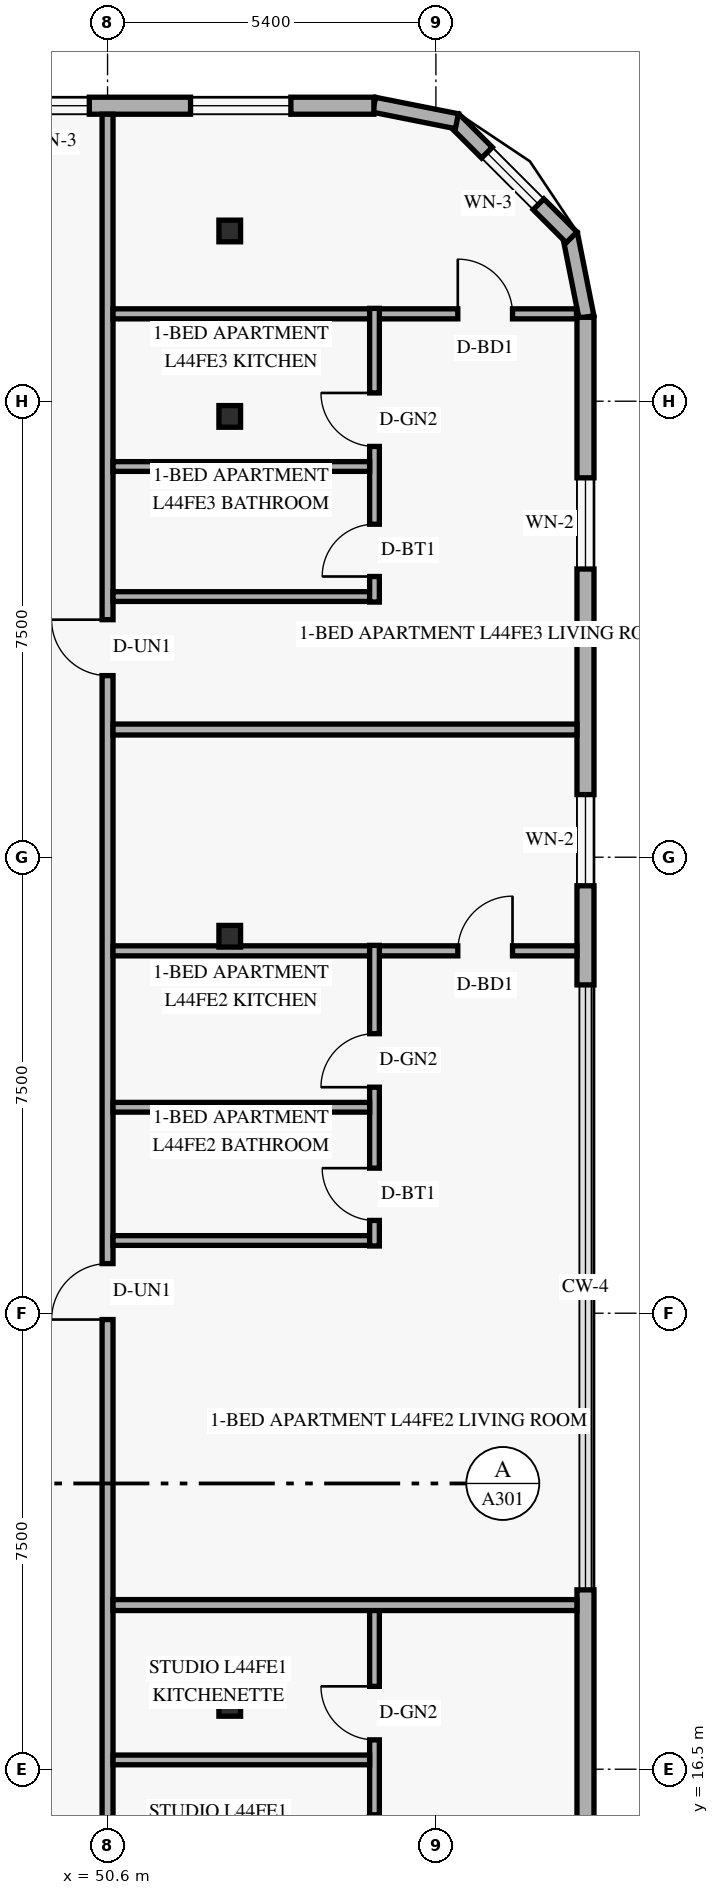
"""IFC4 building model, lengths in metres.
Left out: names, types, materials, properties, quantities, classifications, styles, units other than length and angle.
Written with IfcOpenShell. Run it as: python <this file> out.ifc"""

import sys

from ifc_helpers import new_model, si_unit, direction, frame, frame_2d, origin, origin_2d, place, context, subcontext, project, spatial, rectangle, hollow_rectangle, extrude, element, fill, save


model = new_model("IFC4")
c1 = context("Model", 3, precision=1e-05, world=origin(), true_north=direction((0.0, 1.0)))
c2 = subcontext(c1, "Body", "Model", "MODEL_VIEW")
j1 = project(units=[si_unit("LENGTHUNIT", "METRE"), si_unit("PLANEANGLEUNIT", "RADIAN")], contexts=[c1])
p1 = place(None, origin())
s1 = spatial("IfcSite", under=j1, at=p1, CompositionType="ELEMENT")
p2 = place(p1, origin())
s2 = spatial("IfcBuilding", under=s1, at=p2, CompositionType="ELEMENT")
p3 = place(p2, frame((0.0, 0.0, 169.8)))
s3 = spatial("IfcBuildingStorey", under=s2, at=p3, CompositionType="ELEMENT", Elevation=169.8)
for number, where, z_axis, x_axis in (
    (1, (52.505, 17.55, 0.0), (0.058, 0.0, 0.998), (0.0, 1.0, 0.0)),
    (2, (52.505, 30.2, 0.0), (0.058, 0.0, 0.998), (0.0, 1.0, 0.0)),
    (3, (52.505, 38.75, 0.0), (0.058, 0.0, 0.998), (0.0, 1.0, 0.0)),
    (4, (52.505, 41.8, 0.0), (0.058, 0.0, 0.998), (0.0, 1.0, 0.0)),
):
    element("IfcColumn", number, at=place(p3, frame(where, z_axis=z_axis, x_axis=x_axis)), inside=s3, PredefinedType="COLUMN", context=c2, shape_type="SweptSolid", body=[
        extrude(hollow_rectangle(XDim=0.356, YDim=0.356, WallThickness=0.016, at=origin_2d()), origin(), (0.0, 0.0, 1.0), 3.606),
    ])
p4 = place(p3, frame((58.476, 40.384, 0.0), z_axis=(0.0, 0.0, 1.0), x_axis=(-0.19496651342, 0.980809899341, 0.0)))
e5 = element("IfcWall", 5, at=p4, inside=s3, PredefinedType="SOLIDWALL", context=c2, shape_type="SweptSolid", body=[
    extrude(rectangle(XDim=1.389, YDim=0.25, at=frame_2d((0.694, 0.0))), origin(), (0.0, 0.0, 1.0), 3.35),
])
p5 = place(p3, frame((58.232, 41.695, 0.0), z_axis=(0.0, 0.0, 1.0), x_axis=(-0.707106781187, 0.707106781187, 0.0)))
e6 = element("IfcWall", 6, at=p5, inside=s3, PredefinedType="SOLIDWALL", context=c2, shape_type="SweptSolid", body=[
    extrude(rectangle(XDim=2.739, YDim=0.25, at=frame_2d((1.37, 0.0))), origin(), (0.0, 0.0, 1.0), 3.35),
])
p6 = place(p5, frame((0.77, 0.0, 0.85)))
e7 = element("IfcOpeningElement", 7, at=p6, cuts=e6, PredefinedType="OPENING", context=c2, shape_type="SweptSolid", body=[
    extrude(rectangle(XDim=1.2, YDim=1.5, at=frame_2d((0.6, 0.75))), frame((0.0, 0.135, 0.0), z_axis=(0.0, -1.0, 0.0), x_axis=(1.0, 0.0, 0.0)), (0.0, 0.0, 1.0), 0.27),
])
p7 = place(p3, frame((56.345, 43.605, 0.0), z_axis=(0.0, 0.0, 1.0), x_axis=(-0.980809899341, 0.19496651342, 0.0)))
e8 = element("IfcWall", 8, at=p7, inside=s3, PredefinedType="SOLIDWALL", context=c2, shape_type="SweptSolid", body=[
    extrude(rectangle(XDim=1.389, YDim=0.25, at=frame_2d((0.694, 0.0))), origin(), (0.0, 0.0, 1.0), 3.35),
])
p8 = place(p3, frame((58.46, 7.62, 0.0), z_axis=(0.0, 0.0, 1.0), x_axis=(0.0, 1.0, 0.0)))
e9 = element("IfcWall", 9, at=p8, inside=s3, PredefinedType="SOLIDWALL", context=c2, shape_type="SweptSolid", body=[
    extrude(rectangle(XDim=11.83, YDim=0.28, at=frame_2d((5.915, 0.0))), origin(), (0.0, 0.0, 1.0), 3.35),
])
p9 = place(p8, frame((5.165, 0.0, 0.85)))
e10 = element("IfcOpeningElement", 10, at=p9, cuts=e9, PredefinedType="OPENING", context=c2, shape_type="SweptSolid", body=[
    extrude(rectangle(XDim=1.5, YDim=1.55, at=frame_2d((0.75, 0.775))), frame((0.0, 0.15, 0.0), z_axis=(0.0, -1.0, 0.0), x_axis=(1.0, 0.0, 0.0)), (0.0, 0.0, 1.0), 0.3),
])
p10 = place(p3, frame((58.46, 29.4, 0.0), z_axis=(0.0, 0.0, 1.0), x_axis=(0.0, 1.0, 0.0)))
e11 = element("IfcWall", 11, at=p10, inside=s3, PredefinedType="SOLIDWALL", context=c2, shape_type="SweptSolid", body=[
    extrude(rectangle(XDim=10.98, YDim=0.28, at=frame_2d((5.49, 0.0))), origin(), (0.0, 0.0, 1.0), 3.35),
])
p11 = place(p10, frame((1.63, 0.0, 0.85)))
e12 = element("IfcOpeningElement", 12, at=p11, cuts=e11, PredefinedType="OPENING", context=c2, shape_type="SweptSolid", body=[
    extrude(rectangle(XDim=1.5, YDim=1.55, at=frame_2d((0.75, 0.775))), frame((0.0, 0.15, 0.0), z_axis=(0.0, -1.0, 0.0), x_axis=(1.0, 0.0, 0.0)), (0.0, 0.0, 1.0), 0.3),
])
p12 = place(p10, frame((6.84, 0.0, 0.85)))
e13 = element("IfcOpeningElement", 13, at=p12, cuts=e11, PredefinedType="OPENING", context=c2, shape_type="SweptSolid", body=[
    extrude(rectangle(XDim=1.5, YDim=1.55, at=frame_2d((0.75, 0.775))), frame((0.0, 0.15, 0.0), z_axis=(0.0, -1.0, 0.0), x_axis=(1.0, 0.0, 0.0)), (0.0, 0.0, 1.0), 0.3),
])
p13 = place(p3, frame((54.98, 43.86, 0.0), z_axis=(0.0, 0.0, 1.0), x_axis=(-1.0, 0.0, 0.0)))
e14 = element("IfcWall", 14, at=p13, inside=s3, PredefinedType="SOLIDWALL", context=c2, shape_type="SweptSolid", body=[
    extrude(rectangle(XDim=33.76, YDim=0.28, at=frame_2d((16.88, 0.0))), origin(), (0.0, 0.0, 1.0), 3.35),
])
p14 = place(p13, frame((28.555, 0.0, 0.85)))
e15 = element("IfcOpeningElement", 15, at=p14, cuts=e14, PredefinedType="OPENING", context=c2, shape_type="SweptSolid", body=[
    extrude(rectangle(XDim=1.65, YDim=1.6, at=frame_2d((0.825, 0.8))), frame((0.0, 0.15, 0.0), z_axis=(0.0, -1.0, 0.0), x_axis=(1.0, 0.0, 0.0)), (0.0, 0.0, 1.0), 0.3),
])
p15 = place(p13, frame((21.67, 0.0, 0.85)))
e16 = element("IfcOpeningElement", 16, at=p15, cuts=e14, PredefinedType="OPENING", context=c2, shape_type="SweptSolid", body=[
    extrude(rectangle(XDim=1.65, YDim=1.6, at=frame_2d((0.825, 0.8))), frame((0.0, 0.15, 0.0), z_axis=(0.0, -1.0, 0.0), x_axis=(1.0, 0.0, 0.0)), (0.0, 0.0, 1.0), 0.3),
])
p16 = place(p13, frame((17.44, 0.0, 0.85)))
e17 = element("IfcOpeningElement", 17, at=p16, cuts=e14, PredefinedType="OPENING", context=c2, shape_type="SweptSolid", body=[
    extrude(rectangle(XDim=1.65, YDim=1.6, at=frame_2d((0.825, 0.8))), frame((0.0, 0.15, 0.0), z_axis=(0.0, -1.0, 0.0), x_axis=(1.0, 0.0, 0.0)), (0.0, 0.0, 1.0), 0.3),
])
p17 = place(p13, frame((13.245, 0.0, 0.85)))
e18 = element("IfcOpeningElement", 18, at=p17, cuts=e14, PredefinedType="OPENING", context=c2, shape_type="SweptSolid", body=[
    extrude(rectangle(XDim=1.65, YDim=1.6, at=frame_2d((0.825, 0.8))), frame((0.0, 0.15, 0.0), z_axis=(0.0, -1.0, 0.0), x_axis=(1.0, 0.0, 0.0)), (0.0, 0.0, 1.0), 0.3),
])
p18 = place(p13, frame((7.85, 0.0, 0.85)))
e19 = element("IfcOpeningElement", 19, at=p18, cuts=e14, PredefinedType="OPENING", context=c2, shape_type="SweptSolid", body=[
    extrude(rectangle(XDim=1.65, YDim=1.6, at=frame_2d((0.825, 0.8))), frame((0.0, 0.15, 0.0), z_axis=(0.0, -1.0, 0.0), x_axis=(1.0, 0.0, 0.0)), (0.0, 0.0, 1.0), 0.3),
])
p19 = place(p13, frame((4.68, 0.0, 0.85)))
e20 = element("IfcOpeningElement", 20, at=p19, cuts=e14, PredefinedType="OPENING", context=c2, shape_type="SweptSolid", body=[
    extrude(rectangle(XDim=1.2, YDim=1.5, at=frame_2d((0.6, 0.75))), frame((0.0, 0.15, 0.0), z_axis=(0.0, -1.0, 0.0), x_axis=(1.0, 0.0, 0.0)), (0.0, 0.0, 1.0), 0.3),
])
p20 = place(p13, frame((1.365, 0.0, 0.85)))
e21 = element("IfcOpeningElement", 21, at=p20, cuts=e14, PredefinedType="OPENING", context=c2, shape_type="SweptSolid", body=[
    extrude(rectangle(XDim=1.65, YDim=1.6, at=frame_2d((0.825, 0.8))), frame((0.0, 0.15, 0.0), z_axis=(0.0, -1.0, 0.0), x_axis=(1.0, 0.0, 0.0)), (0.0, 0.0, 1.0), 0.3),
])
p21 = place(p3, frame((50.6, 4.28, 0.0), z_axis=(0.0, 0.0, 1.0), x_axis=(0.0, 1.0, 0.0)))
e22 = element("IfcWall", 22, at=p21, inside=s3, PredefinedType="STANDARD", context=c2, shape_type="SweptSolid", body=[
    extrude(rectangle(XDim=39.44, YDim=0.18, at=frame_2d((19.72, 0.0))), origin(), (0.0, 0.0, 1.0), 2.72),
])
p22 = place(p21, frame((8.98, 0.0, 0.0)))
e23 = element("IfcOpeningElement", 23, at=p22, cuts=e22, PredefinedType="OPENING", context=c2, shape_type="SweptSolid", body=[
    extrude(rectangle(XDim=0.92, YDim=2.15, at=frame_2d((0.46, 1.075))), frame((0.0, 0.1, 0.0), z_axis=(0.0, -1.0, 0.0), x_axis=(1.0, 0.0, 0.0)), (0.0, 0.0, 1.0), 0.2),
])
p23 = place(p21, frame((19.616, 0.0, 0.0)))
e24 = element("IfcOpeningElement", 24, at=p23, cuts=e22, PredefinedType="OPENING", context=c2, shape_type="SweptSolid", body=[
    extrude(rectangle(XDim=0.92, YDim=2.15, at=frame_2d((0.46, 1.075))), frame((0.0, 0.1, 0.0), z_axis=(0.0, -1.0, 0.0), x_axis=(1.0, 0.0, 0.0)), (0.0, 0.0, 1.0), 0.2),
])
p24 = place(p21, frame((30.207, 0.0, 0.0)))
e25 = element("IfcOpeningElement", 25, at=p24, cuts=e22, PredefinedType="OPENING", context=c2, shape_type="SweptSolid", body=[
    extrude(rectangle(XDim=0.92, YDim=2.15, at=frame_2d((0.46, 1.075))), frame((0.0, 0.1, 0.0), z_axis=(0.0, -1.0, 0.0), x_axis=(1.0, 0.0, 0.0)), (0.0, 0.0, 1.0), 0.2),
])
p25 = place(p3, frame((54.99, 14.47, 0.0), z_axis=(0.0, 0.0, 1.0), x_axis=(0.0, 1.0, 0.0)))
e26 = element("IfcWall", 26, at=p25, inside=s3, PredefinedType="PLUMBINGWALL", context=c2, shape_type="SweptSolid", body=[
    extrude(rectangle(XDim=4.73, YDim=0.16, at=frame_2d((2.365, 0.0))), origin(), (0.0, 0.0, 1.0), 3.35),
])
p26 = place(p25, frame((0.42, 0.0, 0.0)))
e27 = element("IfcOpeningElement", 27, at=p26, cuts=e26, PredefinedType="OPENING", context=c2, shape_type="SweptSolid", body=[
    extrude(rectangle(XDim=0.86, YDim=2.12, at=frame_2d((0.43, 1.06))), frame((0.0, 0.09, 0.0), z_axis=(0.0, -1.0, 0.0), x_axis=(1.0, 0.0, 0.0)), (0.0, 0.0, 1.0), 0.18),
])
p27 = place(p25, frame((2.513, 0.0, 0.0)))
e28 = element("IfcOpeningElement", 28, at=p27, cuts=e26, PredefinedType="OPENING", context=c2, shape_type="SweptSolid", body=[
    extrude(rectangle(XDim=0.88, YDim=2.12, at=frame_2d((0.44, 1.06))), frame((0.0, 0.09, 0.0), z_axis=(0.0, -1.0, 0.0), x_axis=(1.0, 0.0, 0.0)), (0.0, 0.0, 1.0), 0.18),
])
p28 = place(p3, frame((50.69, 16.653, 0.0), z_axis=(0.0, 0.0, 1.0), x_axis=(1.0, 0.0, 0.0)))
e29 = element("IfcWall", 29, at=p28, inside=s3, PredefinedType="PLUMBINGWALL", context=c2, shape_type="SweptSolid", body=[
    extrude(rectangle(XDim=4.22, YDim=0.16, at=frame_2d((2.11, 0.0))), origin(), (0.0, 0.0, 1.0), 2.869),
])
p29 = place(p3, frame((50.69, 19.2, 0.0), z_axis=(0.0, 0.0, 1.0), x_axis=(1.0, 0.0, 0.0)))
e30 = element("IfcWall", 30, at=p29, inside=s3, PredefinedType="PARTITIONING", context=c2, shape_type="SweptSolid", body=[
    extrude(rectangle(XDim=7.63, YDim=0.18, at=frame_2d((3.815, 0.0))), origin(), (0.0, 0.0, 1.0), 2.869),
])
p30 = place(p3, frame((50.69, 29.96, 0.0), z_axis=(0.0, 0.0, 1.0), x_axis=(1.0, 0.0, 0.0)))
e31 = element("IfcWall", 31, at=p30, inside=s3, PredefinedType="PARTITIONING", context=c2, shape_type="SweptSolid", body=[
    extrude(rectangle(XDim=7.63, YDim=0.165, at=frame_2d((3.815, 0.0))), origin(), (0.0, 0.0, 1.0), 2.869),
])
p31 = place(p30, frame((5.67, 0.0, 0.0)))
e32 = element("IfcOpeningElement", 32, at=p31, cuts=e31, PredefinedType="OPENING", context=c2, shape_type="SweptSolid", body=[
    extrude(rectangle(XDim=0.9, YDim=2.14, at=frame_2d((0.45, 1.07))), frame((0.0, 0.093, 0.0), z_axis=(0.0, -1.0, 0.0), x_axis=(1.0, 0.0, 0.0)), (0.0, 0.0, 1.0), 0.185),
])
p32 = place(p3, frame((50.69, 25.196, 0.0), z_axis=(0.0, 0.0, 1.0), x_axis=(1.0, 0.0, 0.0)))
e33 = element("IfcWall", 33, at=p32, inside=s3, PredefinedType="PLUMBINGWALL", context=c2, shape_type="SweptSolid", body=[
    extrude(rectangle(XDim=4.38, YDim=0.16, at=frame_2d((2.19, 0.0))), origin(), (0.0, 0.0, 1.0), 2.869),
])
p33 = place(p3, frame((54.99, 25.106, 0.0), z_axis=(0.0, 0.0, 1.0), x_axis=(0.0, 1.0, 0.0)))
e34 = element("IfcWall", 34, at=p33, inside=s3, PredefinedType="PLUMBINGWALL", context=c2, shape_type="SweptSolid", body=[
    extrude(rectangle(XDim=4.944, YDim=0.16, at=frame_2d((2.472, 0.0))), origin(), (0.0, 0.0, 1.0), 3.35),
])
p34 = place(p33, frame((0.42, 0.0, 0.0)))
e35 = element("IfcOpeningElement", 35, at=p34, cuts=e34, PredefinedType="OPENING", context=c2, shape_type="SweptSolid", body=[
    extrude(rectangle(XDim=0.86, YDim=2.12, at=frame_2d((0.43, 1.06))), frame((0.0, 0.09, 0.0), z_axis=(0.0, -1.0, 0.0), x_axis=(1.0, 0.0, 0.0)), (0.0, 0.0, 1.0), 0.18),
])
p35 = place(p33, frame((2.611, 0.0, 0.0)))
e36 = element("IfcOpeningElement", 36, at=p35, cuts=e34, PredefinedType="OPENING", context=c2, shape_type="SweptSolid", body=[
    extrude(rectangle(XDim=0.88, YDim=2.12, at=frame_2d((0.44, 1.06))), frame((0.0, 0.09, 0.0), z_axis=(0.0, -1.0, 0.0), x_axis=(1.0, 0.0, 0.0)), (0.0, 0.0, 1.0), 0.18),
])
p36 = place(p3, frame((50.69, 27.387, 0.0), z_axis=(0.0, 0.0, 1.0), x_axis=(1.0, 0.0, 0.0)))
e37 = element("IfcWall", 37, at=p36, inside=s3, PredefinedType="PLUMBINGWALL", context=c2, shape_type="SweptSolid", body=[
    extrude(rectangle(XDim=4.22, YDim=0.16, at=frame_2d((2.11, 0.0))), origin(), (0.0, 0.0, 1.0), 2.869),
])
p37 = place(p3, frame((50.69, 33.6, 0.0), z_axis=(0.0, 0.0, 1.0), x_axis=(1.0, 0.0, 0.0)))
e38 = element("IfcWall", 38, at=p37, inside=s3, PredefinedType="PARTITIONING", context=c2, shape_type="SweptSolid", body=[
    extrude(rectangle(XDim=7.63, YDim=0.18, at=frame_2d((3.815, 0.0))), origin(), (0.0, 0.0, 1.0), 2.869),
])
p38 = place(p3, frame((50.69, 40.437, 0.0), z_axis=(0.0, 0.0, 1.0), x_axis=(1.0, 0.0, 0.0)))
e39 = element("IfcWall", 39, at=p38, inside=s3, PredefinedType="PARTITIONING", context=c2, shape_type="SweptSolid", body=[
    extrude(rectangle(XDim=7.622, YDim=0.165, at=frame_2d((3.811, 0.0))), origin(), (0.0, 0.0, 1.0), 2.869),
])
p39 = place(p38, frame((5.67, 0.0, 0.0)))
e40 = element("IfcOpeningElement", 40, at=p39, cuts=e39, PredefinedType="OPENING", context=c2, shape_type="SweptSolid", body=[
    extrude(rectangle(XDim=0.9, YDim=2.14, at=frame_2d((0.45, 1.07))), frame((0.0, 0.093, 0.0), z_axis=(0.0, -1.0, 0.0), x_axis=(1.0, 0.0, 0.0)), (0.0, 0.0, 1.0), 0.185),
])
p40 = place(p3, frame((50.69, 35.787, 0.0), z_axis=(0.0, 0.0, 1.0), x_axis=(1.0, 0.0, 0.0)))
e41 = element("IfcWall", 41, at=p40, inside=s3, PredefinedType="PLUMBINGWALL", context=c2, shape_type="SweptSolid", body=[
    extrude(rectangle(XDim=4.38, YDim=0.16, at=frame_2d((2.19, 0.0))), origin(), (0.0, 0.0, 1.0), 2.869),
])
p41 = place(p3, frame((54.99, 35.697, 0.0), z_axis=(0.0, 0.0, 1.0), x_axis=(0.0, 1.0, 0.0)))
e42 = element("IfcWall", 42, at=p41, inside=s3, PredefinedType="PLUMBINGWALL", context=c2, shape_type="SweptSolid", body=[
    extrude(rectangle(XDim=4.83, YDim=0.16, at=frame_2d((2.415, 0.0))), origin(), (0.0, 0.0, 1.0), 3.35),
])
p42 = place(p41, frame((0.42, 0.0, 0.0)))
e43 = element("IfcOpeningElement", 43, at=p42, cuts=e42, PredefinedType="OPENING", context=c2, shape_type="SweptSolid", body=[
    extrude(rectangle(XDim=0.86, YDim=2.12, at=frame_2d((0.43, 1.06))), frame((0.0, 0.09, 0.0), z_axis=(0.0, -1.0, 0.0), x_axis=(1.0, 0.0, 0.0)), (0.0, 0.0, 1.0), 0.18),
])
p43 = place(p41, frame((2.559, 0.0, 0.0)))
e44 = element("IfcOpeningElement", 44, at=p43, cuts=e42, PredefinedType="OPENING", context=c2, shape_type="SweptSolid", body=[
    extrude(rectangle(XDim=0.88, YDim=2.12, at=frame_2d((0.44, 1.06))), frame((0.0, 0.09, 0.0), z_axis=(0.0, -1.0, 0.0), x_axis=(1.0, 0.0, 0.0)), (0.0, 0.0, 1.0), 0.18),
])
p44 = place(p3, frame((50.69, 37.926, 0.0), z_axis=(0.0, 0.0, 1.0), x_axis=(1.0, 0.0, 0.0)))
e45 = element("IfcWall", 45, at=p44, inside=s3, PredefinedType="PLUMBINGWALL", context=c2, shape_type="SweptSolid", body=[
    extrude(rectangle(XDim=4.22, YDim=0.16, at=frame_2d((2.11, 0.0))), origin(), (0.0, 0.0, 1.0), 2.869),
])
p45 = place(p6, origin())
e46 = element("IfcWindow", 46, at=p45, inside=s3, PartitioningType="SINGLE_PANEL", PredefinedType="WINDOW", context=c2, shape_type="SweptSolid", body=[
    extrude(rectangle(XDim=1.2, YDim=1.5, at=frame_2d((0.6, 0.75))), frame((0.0, 0.03, 0.0), z_axis=(0.0, -1.0, 0.0), x_axis=(1.0, 0.0, 0.0)), (0.0, 0.0, 1.0), 0.06),
])
fill(e7, e46)
p46 = place(p11, origin())
e47 = element("IfcWindow", 47, at=p46, inside=s3, PartitioningType="SINGLE_PANEL", PredefinedType="WINDOW", context=c2, shape_type="SweptSolid", body=[
    extrude(rectangle(XDim=1.5, YDim=1.55, at=frame_2d((0.75, 0.775))), frame((0.0, 0.03, 0.0), z_axis=(0.0, -1.0, 0.0), x_axis=(1.0, 0.0, 0.0)), (0.0, 0.0, 1.0), 0.06),
])
fill(e12, e47)
p47 = place(p12, origin())
e48 = element("IfcWindow", 48, at=p47, inside=s3, PartitioningType="SINGLE_PANEL", PredefinedType="WINDOW", context=c2, shape_type="SweptSolid", body=[
    extrude(rectangle(XDim=1.5, YDim=1.55, at=frame_2d((0.75, 0.775))), frame((0.0, 0.03, 0.0), z_axis=(0.0, -1.0, 0.0), x_axis=(1.0, 0.0, 0.0)), (0.0, 0.0, 1.0), 0.06),
])
fill(e13, e48)
p48 = place(p19, origin())
e49 = element("IfcWindow", 49, at=p48, inside=s3, PartitioningType="SINGLE_PANEL", PredefinedType="WINDOW", context=c2, shape_type="SweptSolid", body=[
    extrude(rectangle(XDim=1.2, YDim=1.5, at=frame_2d((0.6, 0.75))), frame((0.0, 0.03, 0.0), z_axis=(0.0, -1.0, 0.0), x_axis=(1.0, 0.0, 0.0)), (0.0, 0.0, 1.0), 0.06),
])
fill(e20, e49)
p49 = place(p20, origin())
e50 = element("IfcWindow", 50, at=p49, inside=s3, PartitioningType="SINGLE_PANEL", PredefinedType="WINDOW", context=c2, shape_type="SweptSolid", body=[
    extrude(rectangle(XDim=1.65, YDim=1.6, at=frame_2d((0.825, 0.8))), frame((0.0, 0.03, 0.0), z_axis=(0.0, -1.0, 0.0), x_axis=(1.0, 0.0, 0.0)), (0.0, 0.0, 1.0), 0.06),
])
fill(e21, e50)
p50 = place(p26, origin())
e51 = element("IfcDoor", 51, at=p50, inside=s3, OperationType="SINGLE_SWING_LEFT", PredefinedType="DOOR", context=c2, shape_type="SweptSolid", body=[
    extrude(rectangle(XDim=0.86, YDim=2.12, at=frame_2d((0.43, 1.06))), frame((0.0, 0.025, 0.0), z_axis=(0.0, -1.0, 0.0), x_axis=(1.0, 0.0, 0.0)), (0.0, 0.0, 1.0), 0.05),
])
fill(e27, e51)
p51 = place(p27, origin())
e52 = element("IfcDoor", 52, at=p51, inside=s3, OperationType="SINGLE_SWING_RIGHT", PredefinedType="DOOR", context=c2, shape_type="SweptSolid", body=[
    extrude(rectangle(XDim=0.88, YDim=2.12, at=frame_2d((0.44, 1.06))), frame((0.0, 0.025, 0.0), z_axis=(0.0, -1.0, 0.0), x_axis=(1.0, 0.0, 0.0)), (0.0, 0.0, 1.0), 0.05),
])
fill(e28, e52)
p52 = place(p23, origin())
e53 = element("IfcDoor", 53, at=p52, inside=s3, OperationType="SINGLE_SWING_LEFT", PredefinedType="DOOR", context=c2, shape_type="SweptSolid", body=[
    extrude(rectangle(XDim=0.92, YDim=2.15, at=frame_2d((0.46, 1.075))), frame((0.0, 0.025, 0.0), z_axis=(0.0, -1.0, 0.0), x_axis=(1.0, 0.0, 0.0)), (0.0, 0.0, 1.0), 0.05),
])
fill(e24, e53)
p53 = place(p34, origin())
e54 = element("IfcDoor", 54, at=p53, inside=s3, OperationType="SINGLE_SWING_RIGHT", PredefinedType="DOOR", context=c2, shape_type="SweptSolid", body=[
    extrude(rectangle(XDim=0.86, YDim=2.12, at=frame_2d((0.43, 1.06))), frame((0.0, 0.025, 0.0), z_axis=(0.0, -1.0, 0.0), x_axis=(1.0, 0.0, 0.0)), (0.0, 0.0, 1.0), 0.05),
])
fill(e35, e54)
p54 = place(p35, origin())
e55 = element("IfcDoor", 55, at=p54, inside=s3, OperationType="SINGLE_SWING_LEFT", PredefinedType="DOOR", context=c2, shape_type="SweptSolid", body=[
    extrude(rectangle(XDim=0.88, YDim=2.12, at=frame_2d((0.44, 1.06))), frame((0.0, 0.025, 0.0), z_axis=(0.0, -1.0, 0.0), x_axis=(1.0, 0.0, 0.0)), (0.0, 0.0, 1.0), 0.05),
])
fill(e36, e55)
p55 = place(p31, origin())
e56 = element("IfcDoor", 56, at=p55, inside=s3, OperationType="SINGLE_SWING_RIGHT", PredefinedType="DOOR", context=c2, shape_type="SweptSolid", body=[
    extrude(rectangle(XDim=0.9, YDim=2.14, at=frame_2d((0.45, 1.07))), frame((0.0, 0.025, 0.0), z_axis=(0.0, -1.0, 0.0), x_axis=(1.0, 0.0, 0.0)), (0.0, 0.0, 1.0), 0.05),
])
fill(e32, e56)
p56 = place(p24, origin())
e57 = element("IfcDoor", 57, at=p56, inside=s3, OperationType="SINGLE_SWING_RIGHT", PredefinedType="DOOR", context=c2, shape_type="SweptSolid", body=[
    extrude(rectangle(XDim=0.92, YDim=2.15, at=frame_2d((0.46, 1.075))), frame((0.0, 0.025, 0.0), z_axis=(0.0, -1.0, 0.0), x_axis=(1.0, 0.0, 0.0)), (0.0, 0.0, 1.0), 0.05),
])
fill(e25, e57)
p57 = place(p42, origin())
e58 = element("IfcDoor", 58, at=p57, inside=s3, OperationType="SINGLE_SWING_LEFT", PredefinedType="DOOR", context=c2, shape_type="SweptSolid", body=[
    extrude(rectangle(XDim=0.86, YDim=2.12, at=frame_2d((0.43, 1.06))), frame((0.0, 0.025, 0.0), z_axis=(0.0, -1.0, 0.0), x_axis=(1.0, 0.0, 0.0)), (0.0, 0.0, 1.0), 0.05),
])
fill(e43, e58)
p58 = place(p43, origin())
e59 = element("IfcDoor", 59, at=p58, inside=s3, OperationType="SINGLE_SWING_RIGHT", PredefinedType="DOOR", context=c2, shape_type="SweptSolid", body=[
    extrude(rectangle(XDim=0.88, YDim=2.12, at=frame_2d((0.44, 1.06))), frame((0.0, 0.025, 0.0), z_axis=(0.0, -1.0, 0.0), x_axis=(1.0, 0.0, 0.0)), (0.0, 0.0, 1.0), 0.05),
])
fill(e44, e59)
p59 = place(p39, origin())
e60 = element("IfcDoor", 60, at=p59, inside=s3, OperationType="SINGLE_SWING_LEFT", PredefinedType="DOOR", context=c2, shape_type="SweptSolid", body=[
    extrude(rectangle(XDim=0.9, YDim=2.14, at=frame_2d((0.45, 1.07))), frame((0.0, 0.025, 0.0), z_axis=(0.0, -1.0, 0.0), x_axis=(1.0, 0.0, 0.0)), (0.0, 0.0, 1.0), 0.05),
])
fill(e40, e60)
save(model, sys.argv[1])
